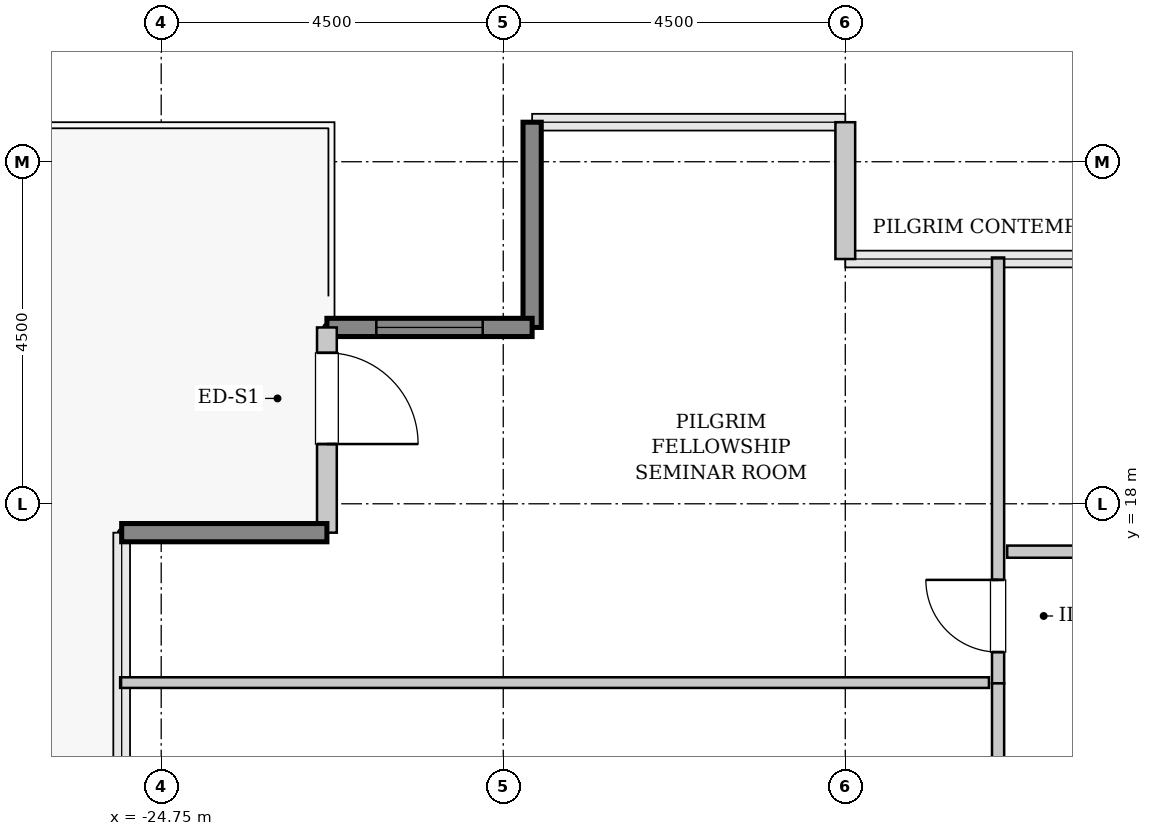
"""IFC4 building model, lengths in metres.
Left out: names, types, materials, properties, quantities, classifications, styles, units other than length and angle.
Written with IfcOpenShell. Run it as: python <this file> out.ifc"""

import sys

from ifc_helpers import new_model, si_unit, direction, frame, frame_2d, origin, place, context, subcontext, project, spatial, rectangle, extrude, source, transform, mapped, element, fill, save


model = new_model("IFC4")
c1 = context("Model", 3, precision=1e-05, world=origin(), true_north=direction((0.0, 1.0)))
c2 = subcontext(c1, "Body", "Model", "MODEL_VIEW")
j1 = project(units=[si_unit("LENGTHUNIT", "METRE"), si_unit("PLANEANGLEUNIT", "RADIAN")], contexts=[c1])
p1 = place(None, origin())
s1 = spatial("IfcSite", under=j1, at=p1, CompositionType="ELEMENT")
p2 = place(p1, origin())
s2 = spatial("IfcBuilding", under=s1, at=p2, CompositionType="ELEMENT")
p3 = place(p2, frame((0.0, 0.0, 206.6)))
s3 = spatial("IfcBuildingStorey", under=s2, at=p3, CompositionType="ELEMENT", Elevation=206.6)
m1 = source(origin(), c2, "Body", "SweptSolid", [
    extrude(rectangle(XDim=1.8, YDim=0.26, at=frame_2d((0.9, 0.0))), origin(), (0.0, 0.0, 1.0), 3.55),
])
p4 = place(p3, frame((-15.75, 21.22, 0.0), z_axis=(0.0, 0.0, 1.0), x_axis=(0.0, 1.0, 0.0)))
e1 = element("IfcWall", 1, at=p4, inside=s3, PredefinedType="SOLIDWALL", context=c2, shape_type="MappedRepresentation", body=[
    mapped(m1, transform((0.0, 0.0, 0.0), x_axis=(1.0, 0.0, 0.0), y_axis=(0.0, 1.0, 0.0), z_axis=(0.0, 0.0, 1.0), scale=1.0)),
])
m2 = source(origin(), c2, "Body", "SweptSolid", [
    extrude(rectangle(XDim=2.7, YDim=0.24, at=frame_2d((1.35, 0.0))), origin(), (0.0, 0.0, 1.0), 3.55),
])
p5 = place(p3, frame((-19.87, 23.02, 0.0), z_axis=(0.0, 0.0, 1.0), x_axis=(0.0, -1.0, 0.0)))
e2 = element("IfcWall", 2, at=p5, inside=s3, PredefinedType="SHEAR", context=c2, shape_type="MappedRepresentation", body=[
    mapped(m2, transform((0.0, 0.0, 0.0), x_axis=(1.0, 0.0, 0.0), y_axis=(0.0, 1.0, 0.0), z_axis=(0.0, 0.0, 1.0), scale=1.0)),
])
p6 = place(p3, frame((-19.87, 20.32, 0.0), z_axis=(0.0, 0.0, 1.0), x_axis=(-1.0, 0.0, 0.0)))
e3 = element("IfcWall", 3, at=p6, inside=s3, PredefinedType="SHEAR", context=c2, shape_type="MappedRepresentation", body=[
    mapped(m2, transform((0.0, 0.0, 0.0), x_axis=(1.0, 0.0, 0.0), y_axis=(0.0, 1.0, 0.0), z_axis=(0.0, 0.0, 1.0), scale=1.0)),
])
p7 = place(p6, frame((0.65, 0.0, 0.85)))
e4 = element("IfcOpeningElement", 4, at=p7, cuts=e3, PredefinedType="OPENING", context=c2, shape_type="SweptSolid", body=[
    extrude(rectangle(XDim=1.4, YDim=1.8, at=frame_2d((0.7, 0.9))), frame((0.0, 0.13, 0.0), z_axis=(0.0, -1.0, 0.0), x_axis=(1.0, 0.0, 0.0)), (0.0, 0.0, 1.0), 0.26),
])
m3 = source(origin(), c2, "Body", "SweptSolid", [
    extrude(rectangle(XDim=2.7, YDim=0.26, at=frame_2d((1.35, 0.0))), origin(), (0.0, 0.0, 1.0), 3.55),
])
p8 = place(p3, frame((-22.57, 20.32, 0.0), z_axis=(0.0, 0.0, 1.0), x_axis=(0.0, -1.0, 0.0)))
e5 = element("IfcWall", 5, at=p8, inside=s3, PredefinedType="SOLIDWALL", context=c2, shape_type="MappedRepresentation", body=[
    mapped(m3, transform((0.0, 0.0, 0.0), x_axis=(1.0, 0.0, 0.0), y_axis=(0.0, 1.0, 0.0), z_axis=(0.0, 0.0, 1.0), scale=1.0)),
])
p9 = place(p8, frame((0.334, 0.0, 0.0)))
e6 = element("IfcOpeningElement", 6, at=p9, cuts=e5, PredefinedType="OPENING", context=c2, shape_type="SweptSolid", body=[
    extrude(rectangle(XDim=1.2, YDim=2.2, at=frame_2d((0.6, 1.1))), frame((0.0, 0.14, 0.0), z_axis=(0.0, -1.0, 0.0), x_axis=(1.0, 0.0, 0.0)), (0.0, 0.0, 1.0), 0.28),
])
p10 = place(p3, frame((-22.57, 17.62, 0.0), z_axis=(0.0, 0.0, 1.0), x_axis=(-1.0, 0.0, 0.0)))
e7 = element("IfcWall", 7, at=p10, inside=s3, PredefinedType="SHEAR", context=c2, shape_type="MappedRepresentation", body=[
    mapped(m2, transform((0.0, 0.0, 0.0), x_axis=(1.0, 0.0, 0.0), y_axis=(0.0, 1.0, 0.0), z_axis=(0.0, 0.0, 1.0), scale=1.0)),
])
m4 = source(origin(), c2, "Body", "SweptSolid", [
    extrude(rectangle(XDim=5.603, YDim=0.16, at=frame_2d((2.801, 0.0))), origin(), (0.0, 0.0, 1.0), 3.535),
])
p11 = place(p3, frame((-13.74, 15.637, 0.0), z_axis=(0.0, 0.0, 1.0), x_axis=(0.0, 1.0, 0.0)))
e8 = element("IfcWall", 8, at=p11, inside=s3, PredefinedType="PARTITIONING", context=c2, shape_type="MappedRepresentation", body=[
    mapped(m4, transform((0.0, 0.0, 0.0), x_axis=(1.0, 0.0, 0.0), y_axis=(0.0, 1.0, 0.0), z_axis=(0.0, 0.0, 1.0), scale=1.0)),
])
p12 = place(p11, frame((0.411, 0.0, 0.0)))
e9 = element("IfcOpeningElement", 9, at=p12, cuts=e8, PredefinedType="OPENING", context=c2, shape_type="SweptSolid", body=[
    extrude(rectangle(XDim=0.95, YDim=2.1, at=frame_2d((0.475, 1.05))), frame((0.0, 0.09, 0.0), z_axis=(0.0, -1.0, 0.0), x_axis=(1.0, 0.0, 0.0)), (0.0, 0.0, 1.0), 0.18),
])
m5 = source(origin(), c2, "Body", "SweptSolid", [
    extrude(rectangle(XDim=11.43, YDim=0.14, at=frame_2d((5.715, 0.0))), origin(), (0.0, 0.0, 1.0), 3.535),
])
p13 = place(p3, frame((-25.29, 15.647, 0.0), z_axis=(0.0, 0.0, 1.0), x_axis=(1.0, 0.0, 0.0)))
e10 = element("IfcWall", 10, at=p13, inside=s3, PredefinedType="PARTITIONING", context=c2, shape_type="MappedRepresentation", body=[
    mapped(m5, transform((0.0, 0.0, 0.0), x_axis=(1.0, 0.0, 0.0), y_axis=(0.0, 1.0, 0.0), z_axis=(0.0, 0.0, 1.0), scale=1.0)),
])
m6 = source(origin(), c2, "Body", "SweptSolid", [
    extrude(rectangle(XDim=7.343, YDim=0.16, at=frame_2d((3.671, 0.0))), origin(), (0.0, 0.0, 1.0), 3.535),
])
p14 = place(p3, frame((-13.74, 8.295, 0.0), z_axis=(0.0, 0.0, 1.0), x_axis=(0.0, 1.0, 0.0)))
e11 = element("IfcWall", 11, at=p14, inside=s3, PredefinedType="PARTITIONING", context=c2, shape_type="MappedRepresentation", body=[
    mapped(m6, transform((0.0, 0.0, 0.0), x_axis=(1.0, 0.0, 0.0), y_axis=(0.0, 1.0, 0.0), z_axis=(0.0, 0.0, 1.0), scale=1.0)),
])
p15 = place(p14, frame((3.196, 0.0, 0.0)))
e12 = element("IfcOpeningElement", 12, at=p15, cuts=e11, PredefinedType="OPENING", context=c2, shape_type="SweptSolid", body=[
    extrude(rectangle(XDim=0.95, YDim=2.1, at=frame_2d((0.475, 1.05))), frame((0.0, 0.09, 0.0), z_axis=(0.0, -1.0, 0.0), x_axis=(1.0, 0.0, 0.0)), (0.0, 0.0, 1.0), 0.18),
])
m7 = source(origin(), c2, "Body", "SweptSolid", [
    extrude(rectangle(XDim=4.16, YDim=0.16, at=frame_2d((2.08, 0.0))), origin(), (0.0, 0.0, 1.0), 3.535),
])
p16 = place(p3, frame((-13.62, 17.37, 0.0), z_axis=(0.0, 0.0, 1.0), x_axis=(1.0, 0.0, 0.0)))
e13 = element("IfcWall", 13, at=p16, inside=s3, PredefinedType="PARTITIONING", context=c2, shape_type="MappedRepresentation", body=[
    mapped(m7, transform((0.0, 0.0, 0.0), x_axis=(1.0, 0.0, 0.0), y_axis=(0.0, 1.0, 0.0), z_axis=(0.0, 0.0, 1.0), scale=1.0)),
])
p17 = place(p16, frame((0.969, 0.0, 0.0)))
e14 = element("IfcOpeningElement", 14, at=p17, cuts=e13, PredefinedType="OPENING", context=c2, shape_type="SweptSolid", body=[
    extrude(rectangle(XDim=0.95, YDim=2.1, at=frame_2d((0.475, 1.05))), frame((0.0, 0.09, 0.0), z_axis=(0.0, -1.0, 0.0), x_axis=(1.0, 0.0, 0.0)), (0.0, 0.0, 1.0), 0.18),
])
m8 = source(origin(), c2, "Body", "SweptSolid", [
    extrude(rectangle(XDim=1.4, YDim=1.8, at=frame_2d((0.7, 0.9))), frame((0.0, 0.03, 0.0), z_axis=(0.0, -1.0, 0.0), x_axis=(1.0, 0.0, 0.0)), (0.0, 0.0, 1.0), 0.06),
])
p18 = place(p7, origin())
e15 = element("IfcWindow", 15, at=p18, inside=s3, PartitioningType="SINGLE_PANEL", PredefinedType="WINDOW", context=c2, shape_type="MappedRepresentation", body=[
    mapped(m8, transform((0.0, 0.0, 0.0), x_axis=(1.0, 0.0, 0.0), y_axis=(0.0, 1.0, 0.0), z_axis=(0.0, 0.0, 1.0), scale=1.0)),
])
fill(e4, e15)
m9 = source(origin(), c2, "Body", "SweptSolid", [
    extrude(rectangle(XDim=1.2, YDim=2.2, at=frame_2d((0.6, 1.1))), frame((0.0, 0.025, 0.0), z_axis=(0.0, -1.0, 0.0), x_axis=(1.0, 0.0, 0.0)), (0.0, 0.0, 1.0), 0.05),
])
p19 = place(p9, origin())
e16 = element("IfcDoor", 16, at=p19, inside=s3, OperationType="SINGLE_SWING_RIGHT", PredefinedType="DOOR", context=c2, shape_type="MappedRepresentation", body=[
    mapped(m9, transform((0.0, 0.0, 0.0), x_axis=(1.0, 0.0, 0.0), y_axis=(0.0, 1.0, 0.0), z_axis=(0.0, 0.0, 1.0), scale=1.0)),
])
fill(e6, e16)
m10 = source(origin(), c2, "Body", "SweptSolid", [
    extrude(rectangle(XDim=0.95, YDim=2.1, at=frame_2d((0.475, 1.05))), frame((0.0, 0.025, 0.0), z_axis=(0.0, -1.0, 0.0), x_axis=(1.0, 0.0, 0.0)), (0.0, 0.0, 1.0), 0.05),
])
p20 = place(p12, origin())
e17 = element("IfcDoor", 17, at=p20, inside=s3, OperationType="SINGLE_SWING_RIGHT", PredefinedType="DOOR", context=c2, shape_type="MappedRepresentation", body=[
    mapped(m10, transform((0.0, 0.0, 0.0), x_axis=(1.0, 0.0, 0.0), y_axis=(0.0, 1.0, 0.0), z_axis=(0.0, 0.0, 1.0), scale=1.0)),
])
fill(e9, e17)
save(model, sys.argv[1])
